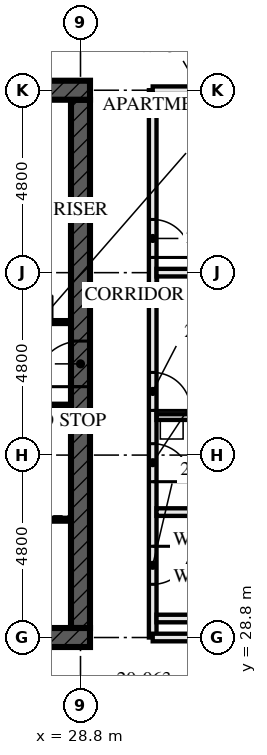
"""IFC4 building model, lengths in metres.
Left out: names, types, materials, properties, quantities, classifications, styles, units other than length and angle.
Written with IfcOpenShell. Run it as: python <this file> out.ifc"""

import sys

from ifc_helpers import new_model, si_unit, direction, frame, frame_2d, origin, place, context, subcontext, project, spatial, rectangle, extrude, element, fill, save


model = new_model("IFC4")
c1 = context("Model", 3, precision=1e-05, world=origin(), true_north=direction((0.0, 1.0)))
c2 = subcontext(c1, "Body", "Model", "MODEL_VIEW")
j1 = project(units=[si_unit("LENGTHUNIT", "METRE"), si_unit("PLANEANGLEUNIT", "RADIAN")], contexts=[c1])
p1 = place(None, origin())
s1 = spatial("IfcSite", under=j1, at=p1, CompositionType="ELEMENT")
p2 = place(p1, origin())
s2 = spatial("IfcBuilding", under=s1, at=p2, CompositionType="ELEMENT")
p3 = place(p2, frame((0.0, 0.0, 76.0)))
s3 = spatial("IfcBuildingStorey", under=s2, at=p3, CompositionType="ELEMENT", Elevation=76.0)
p4 = place(p3, frame((14.15, 28.8, -0.17), z_axis=(0.0, 0.0, 1.0), x_axis=(1.0, 0.0, 0.0)))
e1 = element("IfcWall", 1, at=p4, inside=s3, PredefinedType="SHEAR", context=c2, shape_type="SweptSolid", body=[
    extrude(rectangle(XDim=14.9, YDim=0.5, at=frame_2d((7.45, 0.0))), origin(), (0.0, 0.0, 1.0), 3.42),
])
p5 = place(p4, frame((6.85, 0.0, 0.17)))
e2 = element("IfcOpeningElement", 2, at=p5, cuts=e1, PredefinedType="OPENING", context=c2, shape_type="SweptSolid", body=[
    extrude(rectangle(XDim=1.2, YDim=2.1, at=frame_2d((0.6, 1.05))), frame((0.0, 0.26, 0.0), z_axis=(0.0, -1.0, 0.0), x_axis=(1.0, 0.0, 0.0)), (0.0, 0.0, 1.0), 0.521),
])
p6 = place(p3, frame((29.05, 43.2, -0.17), z_axis=(0.0, 0.0, 1.0), x_axis=(-1.0, 0.0, 0.0)))
e3 = element("IfcWall", 3, at=p6, inside=s3, PredefinedType="SHEAR", context=c2, shape_type="SweptSolid", body=[
    extrude(rectangle(XDim=14.9, YDim=0.5, at=frame_2d((7.45, 0.0))), origin(), (0.0, 0.0, 1.0), 3.42),
])
p7 = place(p6, frame((6.85, 0.0, 0.17)))
e4 = element("IfcOpeningElement", 4, at=p7, cuts=e3, PredefinedType="OPENING", context=c2, shape_type="SweptSolid", body=[
    extrude(rectangle(XDim=1.2, YDim=2.1, at=frame_2d((0.6, 1.05))), frame((0.0, 0.26, 0.0), z_axis=(0.0, -1.0, 0.0), x_axis=(1.0, 0.0, 0.0)), (0.0, 0.0, 1.0), 0.521),
])
p8 = place(p3, frame((28.8, 29.05, -0.17), z_axis=(0.0, 0.0, 1.0), x_axis=(0.0, 1.0, 0.0)))
e5 = element("IfcWall", 5, at=p8, inside=s3, PredefinedType="SHEAR", context=c2, shape_type="SweptSolid", body=[
    extrude(rectangle(XDim=13.9, YDim=0.5, at=frame_2d((6.95, 0.0))), origin(), (0.0, 0.0, 1.0), 3.42),
])
p9 = place(p8, frame((6.35, 0.0, 0.17)))
e6 = element("IfcOpeningElement", 6, at=p9, cuts=e5, PredefinedType="OPENING", context=c2, shape_type="SweptSolid", body=[
    extrude(rectangle(XDim=1.2, YDim=2.1, at=frame_2d((0.6, 1.05))), frame((0.0, 0.26, 0.0), z_axis=(0.0, -1.0, 0.0), x_axis=(1.0, 0.0, 0.0)), (0.0, 0.0, 1.0), 0.521),
])
for number, where, z_axis, x_axis in (
    (7, (35.5, 29.3, 0.0), (0.0, 0.0, 1.0), (-1.0, 0.0, 0.0)),
    (8, (35.5, 32.1, 0.0), (0.0, 0.0, 1.0), (-1.0, 0.0, 0.0)),
):
    element("IfcWall", number, at=place(p3, frame(where, z_axis=z_axis, x_axis=x_axis)), inside=s3, PredefinedType="SOLIDWALL", context=c2, shape_type="SweptSolid", body=[
        extrude(rectangle(XDim=4.7, YDim=0.2, at=frame_2d((2.35, 0.0))), origin(), (0.0, 0.0, 1.0), 2.94),
    ])
p10 = place(p3, frame((33.8, 34.6, 0.0), z_axis=(0.0, 0.0, 1.0), x_axis=(-1.0, 0.0, 0.0)))
e9 = element("IfcWall", 9, at=p10, inside=s3, PredefinedType="PARTITIONING", context=c2, shape_type="SweptSolid", body=[
    extrude(rectangle(XDim=3.0, YDim=0.15, at=frame_2d((1.5, 0.0))), origin(), (0.0, 0.0, 1.0), 3.25),
])
p11 = place(p3, frame((42.88, 38.4, 0.0), z_axis=(0.0, 0.0, 1.0), x_axis=(-1.0, 0.0, 0.0)))
e10 = element("IfcWall", 10, at=p11, inside=s3, PredefinedType="PARTITIONING", context=c2, shape_type="SweptSolid", body=[
    extrude(rectangle(XDim=12.08, YDim=0.2, at=frame_2d((6.04, 0.0))), origin(), (0.0, 0.0, 1.0), 2.04),
])
p12 = place(p3, frame((30.7, 28.8, 0.0), z_axis=(0.0, 0.0, 1.0), x_axis=(0.0, 1.0, 0.0)))
e11 = element("IfcWall", 11, at=p12, inside=s3, PredefinedType="PARTITIONING", context=c2, shape_type="SweptSolid", body=[
    extrude(rectangle(XDim=14.4, YDim=0.2, at=frame_2d((7.2, 0.0))), origin(), (0.0, 0.0, 1.0), 2.04),
])
p13 = place(p12, frame((1.4, 0.0, 0.0)))
e12 = element("IfcOpeningElement", 12, at=p13, cuts=e11, PredefinedType="OPENING", context=c2, shape_type="SweptSolid", body=[
    extrude(rectangle(XDim=1.0, YDim=2.0, at=frame_2d((0.5, 1.0))), frame((0.0, 0.111, 0.0), z_axis=(0.0, -1.0, 0.0), x_axis=(1.0, 0.0, 0.0)), (0.0, 0.0, 1.0), 0.221),
])
p14 = place(p12, frame((4.1, 0.0, 0.0)))
e13 = element("IfcOpeningElement", 13, at=p14, cuts=e11, PredefinedType="OPENING", context=c2, shape_type="SweptSolid", body=[
    extrude(rectangle(XDim=1.0, YDim=2.0, at=frame_2d((0.5, 1.0))), frame((0.0, 0.111, 0.0), z_axis=(0.0, -1.0, 0.0), x_axis=(1.0, 0.0, 0.0)), (0.0, 0.0, 1.0), 0.221),
])
p15 = place(p12, frame((5.975, 0.0, 0.0)))
e14 = element("IfcOpeningElement", 14, at=p15, cuts=e11, PredefinedType="OPENING", context=c2, shape_type="SweptSolid", body=[
    extrude(rectangle(XDim=1.0, YDim=2.0, at=frame_2d((0.5, 1.0))), frame((0.0, 0.111, 0.0), z_axis=(0.0, -1.0, 0.0), x_axis=(1.0, 0.0, 0.0)), (0.0, 0.0, 1.0), 0.221),
])
p16 = place(p12, frame((10.0, 0.0, 0.0)))
e15 = element("IfcOpeningElement", 15, at=p16, cuts=e11, PredefinedType="OPENING", context=c2, shape_type="SweptSolid", body=[
    extrude(rectangle(XDim=1.0, YDim=2.0, at=frame_2d((0.5, 1.0))), frame((0.0, 0.111, 0.0), z_axis=(0.0, -1.0, 0.0), x_axis=(1.0, 0.0, 0.0)), (0.0, 0.0, 1.0), 0.221),
])
p17 = place(p3, frame((23.05, 34.9, 0.0), z_axis=(0.0, 0.0, 1.0), x_axis=(1.0, 0.0, 0.0)))
e16 = element("IfcWall", 16, at=p17, inside=s3, PredefinedType="SOLIDWALL", context=c2, shape_type="SweptSolid", body=[
    extrude(rectangle(XDim=5.5, YDim=0.1, at=frame_2d((2.75, 0.0))), origin(), (0.0, 0.0, 1.0), 3.25),
])
p18 = place(p3, frame((22.65, 37.1, 0.0), z_axis=(0.0, 0.0, 1.0), x_axis=(1.0, 0.0, 0.0)))
e17 = element("IfcWall", 17, at=p18, inside=s3, PredefinedType="SOLIDWALL", context=c2, shape_type="SweptSolid", body=[
    extrude(rectangle(XDim=5.9, YDim=0.1, at=frame_2d((2.95, 0.0))), origin(), (0.0, 0.0, 1.0), 3.25),
])
p19 = place(p18, frame((3.15, 0.0, 0.0)))
e18 = element("IfcOpeningElement", 18, at=p19, cuts=e17, PredefinedType="OPENING", context=c2, shape_type="SweptSolid", body=[
    extrude(rectangle(XDim=0.9, YDim=2.1, at=frame_2d((0.45, 1.05))), frame((0.0, 0.061, 0.0), z_axis=(0.0, -1.0, 0.0), x_axis=(1.0, 0.0, 0.0)), (0.0, 0.0, 1.0), 0.121),
])
p20 = place(p18, frame((4.7, 0.0, 0.0)))
e19 = element("IfcOpeningElement", 19, at=p20, cuts=e17, PredefinedType="OPENING", context=c2, shape_type="SweptSolid", body=[
    extrude(rectangle(XDim=0.7, YDim=2.1, at=frame_2d((0.35, 1.05))), frame((0.0, 0.061, 0.0), z_axis=(0.0, -1.0, 0.0), x_axis=(1.0, 0.0, 0.0)), (0.0, 0.0, 1.0), 0.121),
])
p21 = place(p3, frame((23.15, 31.9, 0.0), z_axis=(0.0, 0.0, 1.0), x_axis=(1.0, 0.0, 0.0)))
e20 = element("IfcWall", 20, at=p21, inside=s3, PredefinedType="SOLIDWALL", context=c2, shape_type="SweptSolid", body=[
    extrude(rectangle(XDim=5.4, YDim=0.1, at=frame_2d((2.7, 0.0))), origin(), (0.0, 0.0, 1.0), 3.25),
])
for number, where, z_axis, x_axis in (
    (21, (33.205, 28.8, 0.0), (0.0, 0.0, 1.0), (-1.0, 0.0, 0.0)),
    (22, (33.205, 43.2, 0.0), (0.0, 0.0, 1.0), (-1.0, 0.0, 0.0)),
):
    element("IfcWall", number, at=place(p3, frame(where, z_axis=z_axis, x_axis=x_axis)), inside=s3, PredefinedType="PARTITIONING", context=c2, shape_type="SweptSolid", body=[
        extrude(rectangle(XDim=2.505, YDim=0.2, at=frame_2d((1.252, 0.0))), origin(), (0.0, 0.0, 1.0), 2.04),
    ])
p22 = place(p13, frame((1.0, 0.0, 0.0), z_axis=(0.0, 0.0, 1.0), x_axis=(-1.0, 0.0, 0.0)))
e23 = element("IfcDoor", 23, at=p22, inside=s3, OperationType="SINGLE_SWING_RIGHT", PredefinedType="DOOR", context=c2, shape_type="SweptSolid", body=[
    extrude(rectangle(XDim=1.0, YDim=2.0, at=frame_2d((0.5, 1.0))), frame((0.0, 0.032, 0.0), z_axis=(0.0, -1.0, 0.0), x_axis=(1.0, 0.0, 0.0)), (0.0, 0.0, 1.0), 0.064),
])
fill(e12, e23)
p23 = place(p14, frame((1.0, 0.0, 0.0), z_axis=(0.0, 0.0, 1.0), x_axis=(-1.0, 0.0, 0.0)))
e24 = element("IfcDoor", 24, at=p23, inside=s3, OperationType="SINGLE_SWING_LEFT", PredefinedType="DOOR", context=c2, shape_type="SweptSolid", body=[
    extrude(rectangle(XDim=1.0, YDim=2.0, at=frame_2d((0.5, 1.0))), frame((0.0, 0.027, 0.0), z_axis=(0.0, -1.0, 0.0), x_axis=(1.0, 0.0, 0.0)), (0.0, 0.0, 1.0), 0.054),
])
fill(e13, e24)
p24 = place(p15, frame((1.0, 0.0, 0.0), z_axis=(0.0, 0.0, 1.0), x_axis=(-1.0, 0.0, 0.0)))
e25 = element("IfcDoor", 25, at=p24, inside=s3, OperationType="SINGLE_SWING_LEFT", PredefinedType="DOOR", context=c2, shape_type="SweptSolid", body=[
    extrude(rectangle(XDim=1.0, YDim=2.0, at=frame_2d((0.5, 1.0))), frame((0.0, 0.027, 0.0), z_axis=(0.0, -1.0, 0.0), x_axis=(1.0, 0.0, 0.0)), (0.0, 0.0, 1.0), 0.054),
])
fill(e14, e25)
p25 = place(p16, frame((1.0, 0.0, 0.0), z_axis=(0.0, 0.0, 1.0), x_axis=(-1.0, 0.0, 0.0)))
e26 = element("IfcDoor", 26, at=p25, inside=s3, OperationType="SINGLE_SWING_LEFT", PredefinedType="DOOR", context=c2, shape_type="SweptSolid", body=[
    extrude(rectangle(XDim=1.0, YDim=2.0, at=frame_2d((0.5, 1.0))), frame((0.0, 0.027, 0.0), z_axis=(0.0, -1.0, 0.0), x_axis=(1.0, 0.0, 0.0)), (0.0, 0.0, 1.0), 0.054),
])
fill(e15, e26)
p26 = place(p9, origin())
e27 = element("IfcDoor", 27, at=p26, inside=s3, OperationType="SINGLE_SWING_LEFT", PredefinedType="DOOR", context=c2, shape_type="SweptSolid", body=[
    extrude(rectangle(XDim=1.2, YDim=2.1, at=frame_2d((0.6, 1.05))), frame((0.0, 0.027, 0.0), z_axis=(0.0, -1.0, 0.0), x_axis=(1.0, 0.0, 0.0)), (0.0, 0.0, 1.0), 0.054),
])
fill(e6, e27)
save(model, sys.argv[1])
